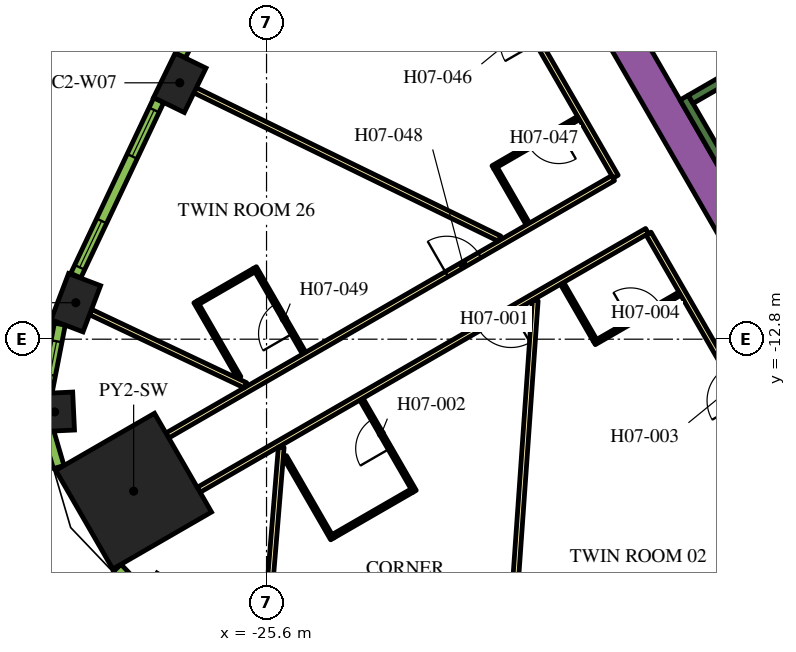
"""IFC4 building model, lengths in metres.
Left out: names, types, materials, properties, quantities, classifications, styles, units other than length and angle.
Written with IfcOpenShell. Run it as: python <this file> out.ifc"""

import sys

from ifc_helpers import new_model, si_unit, direction, frame, frame_2d, origin, origin_2d, place, context, subcontext, project, spatial, rectangle, extrude, element, fill, save


model = new_model("IFC4")
c1 = context("Model", 3, precision=1e-05, world=origin(), true_north=direction((0.0, 1.0)))
c2 = subcontext(c1, "Body", "Model", "MODEL_VIEW")
j1 = project(units=[si_unit("LENGTHUNIT", "METRE"), si_unit("PLANEANGLEUNIT", "RADIAN")], contexts=[c1])
p1 = place(None, origin())
s1 = spatial("IfcSite", under=j1, at=p1, CompositionType="ELEMENT")
p2 = place(p1, origin())
s2 = spatial("IfcBuilding", under=s1, at=p2, CompositionType="ELEMENT")
p3 = place(p2, frame((0.0, 0.0, 95.4)))
s3 = spatial("IfcBuildingStorey", under=s2, at=p3, CompositionType="ELEMENT", Elevation=95.4)
p4 = place(p3, frame((-29.097, -16.799, 0.0), z_axis=(0.0, 0.0, 1.0), x_axis=(-0.866025403784, -0.5, 0.0)))
e1 = element("IfcColumn", 1, at=p4, inside=s3, PredefinedType="COLUMN", context=c2, shape_type="SweptSolid", body=[
    extrude(rectangle(XDim=3.0, YDim=3.0, at=origin_2d()), origin(), (0.0, 0.0, 1.0), 3.9),
])
for number, where, z_axis, x_axis in (
    (2, (-27.883, -6.054, 0.0), (0.0, 0.0, 1.0), (-0.438, -0.899, 0.0)),
    (3, (-30.619, -11.839, 0.0), (0.0, 0.0, 1.0), (-0.355, -0.935, 0.0)),
):
    element("IfcColumn", number, at=place(p3, frame(where, z_axis=z_axis, x_axis=x_axis)), inside=s3, PredefinedType="COLUMN", context=c2, shape_type="SweptSolid", body=[
        extrude(rectangle(XDim=1.3, YDim=0.9, at=origin_2d()), origin(), (0.0, 0.0, 1.0), 3.9),
    ])
p5 = place(p3, frame((-31.177, -14.714, 0.0), z_axis=(0.0, 0.0, 1.0), x_axis=(0.046756026083, -0.998906338965, 0.0)))
e4 = element("IfcColumn", 4, at=p5, inside=s3, PredefinedType="COLUMN", context=c2, shape_type="SweptSolid", body=[
    extrude(rectangle(XDim=1.0, YDim=1.0, at=origin_2d()), origin(), (0.0, 0.0, 1.0), 3.9),
])
p6 = place(p3, frame((-12.134, -11.883, 0.0), z_axis=(0.0, 0.0, 1.0), x_axis=(-0.500005339912, 0.866022320763, 0.0)))
e5 = element("IfcWall", 5, at=p6, inside=s3, PredefinedType="SOLIDWALL", context=c2, shape_type="SweptSolid", body=[
    extrude(rectangle(XDim=9.488, YDim=0.9, at=frame_2d((4.744, 0.0))), origin(), (0.0, 0.0, 1.0), 3.9),
])
p7 = place(p3, frame((-12.885, -9.431, 0.0), z_axis=(0.0, 0.0, 1.0), x_axis=(-0.500020560727, 0.866013532718, 0.0)))
e6 = element("IfcWall", 6, at=p7, inside=s3, PredefinedType="SOLIDWALL", context=c2, shape_type="SweptSolid", body=[
    extrude(rectangle(XDim=3.45, YDim=0.25, at=frame_2d((1.725, 0.0))), origin(), (0.0, 0.0, 1.0), 3.9),
])
p8 = place(p3, frame((-14.44, -6.49, 0.0), z_axis=(0.0, 0.0, 1.0), x_axis=(0.866022966069, 0.500004222222, 0.0)))
e7 = element("IfcWall", 7, at=p8, inside=s3, PredefinedType="SOLIDWALL", context=c2, shape_type="SweptSolid", body=[
    extrude(rectangle(XDim=6.8, YDim=0.25, at=frame_2d((3.4, 0.0))), origin(), (0.0, 0.0, 1.0), 3.9),
])
p9 = place(p3, frame((-16.412, -8.523, 0.0), z_axis=(0.0, 0.0, 1.0), x_axis=(-0.500001929737, 0.866024289647, 0.0)))
e8 = element("IfcWall", 8, at=p9, inside=s3, PredefinedType="PARTITIONING", context=c2, shape_type="SweptSolid", body=[
    extrude(rectangle(XDim=5.268, YDim=0.15, at=frame_2d((2.634, 0.0))), origin(), (0.0, 0.0, 1.0), 2.75),
])
p10 = place(p9, frame((4.088, 0.0, 0.0)))
e9 = element("IfcOpeningElement", 9, at=p10, cuts=e8, PredefinedType="OPENING", context=c2, shape_type="SweptSolid", body=[
    extrude(rectangle(XDim=1.0, YDim=2.1, at=frame_2d((0.5, 1.05))), frame((0.0, 0.085, 0.0), z_axis=(0.0, -1.0, 0.0), x_axis=(1.0, 0.0, 0.0)), (0.0, 0.0, 1.0), 0.17),
])
p11 = place(p3, frame((-28.211, -15.335, 0.0), z_axis=(0.0, 0.0, 1.0), x_axis=(0.866025884867, 0.49999916674, 0.0)))
e10 = element("IfcWall", 10, at=p11, inside=s3, PredefinedType="PARTITIONING", context=c2, shape_type="SweptSolid", body=[
    extrude(rectangle(XDim=13.543, YDim=0.15, at=frame_2d((6.772, 0.0))), origin(), (0.0, 0.0, 1.0), 2.75),
])
p12 = place(p11, frame((8.488, 0.0, 0.0)))
e11 = element("IfcOpeningElement", 11, at=p12, cuts=e10, PredefinedType="OPENING", context=c2, shape_type="SweptSolid", body=[
    extrude(rectangle(XDim=1.0, YDim=2.1, at=frame_2d((0.5, 1.05))), frame((0.0, 0.085, 0.0), z_axis=(0.0, -1.0, 0.0), x_axis=(1.0, 0.0, 0.0)), (0.0, 0.0, 1.0), 0.17),
])
p13 = place(p3, frame((-15.587, -9.952, 0.0), z_axis=(0.0, 0.0, 1.0), x_axis=(-0.866017869832, -0.500013048961, 0.0)))
e12 = element("IfcWall", 12, at=p13, inside=s3, PredefinedType="PARTITIONING", context=c2, shape_type="SweptSolid", body=[
    extrude(rectangle(XDim=13.624, YDim=0.15, at=frame_2d((6.812, 0.0))), origin(), (0.0, 0.0, 1.0), 2.75),
])
p14 = place(p13, frame((4.134, 0.0, 0.0)))
e13 = element("IfcOpeningElement", 13, at=p14, cuts=e12, PredefinedType="OPENING", context=c2, shape_type="SweptSolid", body=[
    extrude(rectangle(XDim=1.0, YDim=2.1, at=frame_2d((0.5, 1.05))), frame((0.0, 0.085, 0.0), z_axis=(0.0, -1.0, 0.0), x_axis=(1.0, 0.0, 0.0)), (0.0, 0.0, 1.0), 0.17),
])
p15 = place(p3, frame((-12.918, -14.575, 0.0), z_axis=(0.0, 0.0, 1.0), x_axis=(-0.500009150678, 0.866020120573, 0.0)))
e14 = element("IfcWall", 14, at=p15, inside=s3, PredefinedType="PARTITIONING", context=c2, shape_type="SweptSolid", body=[
    extrude(rectangle(XDim=5.258, YDim=0.15, at=frame_2d((2.629, 0.0))), origin(), (0.0, 0.0, 1.0), 2.75),
])
p16 = place(p15, frame((0.18, 0.0, 0.0)))
e15 = element("IfcOpeningElement", 15, at=p16, cuts=e14, PredefinedType="OPENING", context=c2, shape_type="SweptSolid", body=[
    extrude(rectangle(XDim=1.0, YDim=2.1, at=frame_2d((0.5, 1.05))), frame((0.0, 0.085, 0.0), z_axis=(0.0, -1.0, 0.0), x_axis=(1.0, 0.0, 0.0)), (0.0, 0.0, 1.0), 0.17),
])
p17 = place(p3, frame((-30.231, -12.085, 0.0), z_axis=(0.0, 0.0, 1.0), x_axis=(0.904001132572, -0.427530060122, 0.0)))
e16 = element("IfcWall", 16, at=p17, inside=s3, PredefinedType="PARTITIONING", context=c2, shape_type="SweptSolid", body=[
    extrude(rectangle(XDim=4.51, YDim=0.15, at=frame_2d((2.255, 0.0))), origin(), (0.0, 0.0, 1.0), 2.75),
])
p18 = place(p3, frame((-25.582, -20.138, 0.0), z_axis=(0.0, 0.0, 1.0), x_axis=(0.081746132986, 0.996653184283, 0.0)))
e17 = element("IfcWall", 17, at=p18, inside=s3, PredefinedType="PARTITIONING", context=c2, shape_type="SweptSolid", body=[
    extrude(rectangle(XDim=4.51, YDim=0.15, at=frame_2d((2.255, 0.0))), origin(), (0.0, 0.0, 1.0), 2.75),
])
p19 = place(p3, frame((-27.479, -6.251, 0.0), z_axis=(0.0, 0.0, 1.0), x_axis=(0.898945877276, -0.438059710231, 0.0)))
e18 = element("IfcWall", 18, at=p19, inside=s3, PredefinedType="PARTITIONING", context=c2, shape_type="SweptSolid", body=[
    extrude(rectangle(XDim=8.909, YDim=0.15, at=frame_2d((4.455, 0.0))), origin(), (0.0, 0.0, 1.0), 2.75),
])
p20 = place(p3, frame((-19.153, -20.671, 0.0), z_axis=(0.0, 0.0, 1.0), x_axis=(0.070070736723, 0.997542025107, 0.0)))
e19 = element("IfcWall", 19, at=p20, inside=s3, PredefinedType="PARTITIONING", context=c2, shape_type="SweptSolid", body=[
    extrude(rectangle(XDim=8.909, YDim=0.15, at=frame_2d((4.455, 0.0))), origin(), (0.0, 0.0, 1.0), 2.75),
])
p21 = place(p3, frame((-21.704, -16.803, 0.0), z_axis=(0.0, 0.0, 1.0), x_axis=(-0.500049511043, 0.865996816683, 0.0)))
e20 = element("IfcWall", 20, at=p21, inside=s3, PredefinedType="PARTITIONING", context=c2, shape_type="SweptSolid", body=[
    extrude(rectangle(XDim=2.8, YDim=0.1, at=frame_2d((1.4, 0.0))), origin(), (0.0, 0.0, 1.0), 2.75),
])
p22 = place(p21, frame((1.3, 0.0, 0.0)))
e21 = element("IfcOpeningElement", 21, at=p22, cuts=e20, PredefinedType="OPENING", context=c2, shape_type="SweptSolid", body=[
    extrude(rectangle(XDim=0.9, YDim=2.1, at=frame_2d((0.45, 1.05))), frame((0.0, 0.06, 0.0), z_axis=(0.0, -1.0, 0.0), x_axis=(1.0, 0.0, 0.0)), (0.0, 0.0, 1.0), 0.12),
])
p23 = place(p3, frame((-21.772, -16.785, 0.0), z_axis=(0.0, 0.0, 1.0), x_axis=(-0.866024647952, -0.500001309137, 0.0)))
e22 = element("IfcWall", 22, at=p23, inside=s3, PredefinedType="PARTITIONING", context=c2, shape_type="SweptSolid", body=[
    extrude(rectangle(XDim=2.4, YDim=0.1, at=frame_2d((1.2, 0.0))), origin(), (0.0, 0.0, 1.0), 2.75),
])
p24 = place(p3, frame((-25.119, -15.888, 0.0), z_axis=(0.0, 0.0, 1.0), x_axis=(0.500046524342, -0.865998541277, 0.0)))
e23 = element("IfcWall", 23, at=p24, inside=s3, PredefinedType="PARTITIONING", context=c2, shape_type="SweptSolid", body=[
    extrude(rectangle(XDim=2.5, YDim=0.1, at=frame_2d((1.25, 0.0))), origin(), (0.0, 0.0, 1.0), 2.75),
])
p25 = place(p3, frame((-16.974, -12.9, 0.0), z_axis=(0.0, 0.0, 1.0), x_axis=(0.865997922154, 0.500047596559, 0.0)))
e24 = element("IfcWall", 24, at=p25, inside=s3, PredefinedType="PARTITIONING", context=c2, shape_type="SweptSolid", body=[
    extrude(rectangle(XDim=2.6, YDim=0.1, at=frame_2d((1.3, 0.0))), origin(), (0.0, 0.0, 1.0), 2.75),
])
p26 = place(p25, frame((1.1, 0.0, 0.0)))
e25 = element("IfcOpeningElement", 25, at=p26, cuts=e24, PredefinedType="OPENING", context=c2, shape_type="SweptSolid", body=[
    extrude(rectangle(XDim=0.9, YDim=2.1, at=frame_2d((0.45, 1.05))), frame((0.0, 0.06, 0.0), z_axis=(0.0, -1.0, 0.0), x_axis=(1.0, 0.0, 0.0)), (0.0, 0.0, 1.0), 0.12),
])
p27 = place(p3, frame((-16.956, -12.832, 0.0), z_axis=(0.0, 0.0, 1.0), x_axis=(-0.499978980201, 0.866037539231, 0.0)))
e26 = element("IfcWall", 26, at=p27, inside=s3, PredefinedType="PARTITIONING", context=c2, shape_type="SweptSolid", body=[
    extrude(rectangle(XDim=1.73, YDim=0.1, at=frame_2d((0.865, 0.0))), origin(), (0.0, 0.0, 1.0), 2.75),
])
p28 = place(p3, frame((-17.39, -6.979, 0.0), z_axis=(0.0, 0.0, 1.0), x_axis=(-0.866021400173, -0.500006934395, 0.0)))
e27 = element("IfcWall", 27, at=p28, inside=s3, PredefinedType="PARTITIONING", context=c2, shape_type="SweptSolid", body=[
    extrude(rectangle(XDim=2.6, YDim=0.1, at=frame_2d((1.3, 0.0))), origin(), (0.0, 0.0, 1.0), 2.75),
])
p29 = place(p28, frame((0.6, 0.0, 0.0)))
e28 = element("IfcOpeningElement", 28, at=p29, cuts=e27, PredefinedType="OPENING", context=c2, shape_type="SweptSolid", body=[
    extrude(rectangle(XDim=0.9, YDim=2.1, at=frame_2d((0.45, 1.05))), frame((0.0, 0.06, 0.0), z_axis=(0.0, -1.0, 0.0), x_axis=(1.0, 0.0, 0.0)), (0.0, 0.0, 1.0), 0.12),
])
p30 = place(p3, frame((-19.574, -8.297, 0.0), z_axis=(0.0, 0.0, 1.0), x_axis=(0.500062241894, -0.865989465428, 0.0)))
e29 = element("IfcWall", 29, at=p30, inside=s3, PredefinedType="PARTITIONING", context=c2, shape_type="SweptSolid", body=[
    extrude(rectangle(XDim=1.7, YDim=0.1, at=frame_2d((0.85, 0.0))), origin(), (0.0, 0.0, 1.0), 2.75),
])
p31 = place(p3, frame((-24.61, -13.169, 0.0), z_axis=(0.0, 0.0, 1.0), x_axis=(-0.500006934395, 0.866021400173, 0.0)))
e30 = element("IfcWall", 30, at=p31, inside=s3, PredefinedType="PARTITIONING", context=c2, shape_type="SweptSolid", body=[
    extrude(rectangle(XDim=2.6, YDim=0.1, at=frame_2d((1.3, 0.0))), origin(), (0.0, 0.0, 1.0), 2.75),
])
p32 = place(p31, frame((0.6, 0.0, 0.0)))
e31 = element("IfcOpeningElement", 31, at=p32, cuts=e30, PredefinedType="OPENING", context=c2, shape_type="SweptSolid", body=[
    extrude(rectangle(XDim=0.9, YDim=2.1, at=frame_2d((0.45, 1.05))), frame((0.0, 0.06, 0.0), z_axis=(0.0, -1.0, 0.0), x_axis=(1.0, 0.0, 0.0)), (0.0, 0.0, 1.0), 0.12),
])
p33 = place(p3, frame((-25.928, -10.986, 0.0), z_axis=(0.0, 0.0, 1.0), x_axis=(-0.865989465428, -0.500062241894, 0.0)))
e32 = element("IfcWall", 32, at=p33, inside=s3, PredefinedType="PARTITIONING", context=c2, shape_type="SweptSolid", body=[
    extrude(rectangle(XDim=1.7, YDim=0.1, at=frame_2d((0.85, 0.0))), origin(), (0.0, 0.0, 1.0), 2.75),
])
p34 = place(p3, frame((-26.319, -13.81, 0.0), z_axis=(0.0, 0.0, 1.0), x_axis=(-0.499952165731, 0.866053019151, 0.0)))
e33 = element("IfcWall", 33, at=p34, inside=s3, PredefinedType="PARTITIONING", context=c2, shape_type="SweptSolid", body=[
    extrude(rectangle(XDim=2.3, YDim=0.1, at=frame_2d((1.15, 0.0))), origin(), (0.0, 0.0, 1.0), 2.75),
])
p35 = place(p3, frame((-25.576, -0.778, 0.0), z_axis=(0.0, 0.0, 1.0), x_axis=(-0.448534297211, -0.893765620409, 0.0)))
e34 = element("IfcWall", 34, at=p35, inside=s3, PredefinedType="SOLIDWALL", context=c2, shape_type="SweptSolid", body=[
    extrude(rectangle(XDim=5.1, YDim=0.29, at=frame_2d((2.55, 0.0))), origin(), (0.0, 0.0, 1.0), 3.65),
])
p36 = place(p35, frame((0.272, 0.0, 0.9)))
e35 = element("IfcOpeningElement", 35, at=p36, cuts=e34, PredefinedType="OPENING", context=c2, shape_type="SweptSolid", body=[
    extrude(rectangle(XDim=1.35, YDim=2.15, at=frame_2d((0.675, 1.075))), frame((0.0, 0.155, 0.0), z_axis=(0.0, -1.0, 0.0), x_axis=(1.0, 0.0, 0.0)), (0.0, 0.0, 1.0), 0.31),
])
p37 = place(p35, frame((3.478, 0.0, 0.9)))
e36 = element("IfcOpeningElement", 36, at=p37, cuts=e34, PredefinedType="OPENING", context=c2, shape_type="SweptSolid", body=[
    extrude(rectangle(XDim=1.35, YDim=2.15, at=frame_2d((0.675, 1.075))), frame((0.0, 0.155, 0.0), z_axis=(0.0, -1.0, 0.0), x_axis=(1.0, 0.0, 0.0)), (0.0, 0.0, 1.0), 0.31),
])
p38 = place(p3, frame((-28.436, -6.511, 0.0), z_axis=(0.0, 0.0, 1.0), x_axis=(-0.427543726596, -0.903994669148, 0.0)))
e37 = element("IfcWall", 37, at=p38, inside=s3, PredefinedType="SOLIDWALL", context=c2, shape_type="SweptSolid", body=[
    extrude(rectangle(XDim=5.107, YDim=0.29, at=frame_2d((2.553, 0.0))), origin(), (0.0, 0.0, 1.0), 3.65),
])
p39 = place(p38, frame((0.285, 0.0, 0.9)))
e38 = element("IfcOpeningElement", 38, at=p39, cuts=e37, PredefinedType="OPENING", context=c2, shape_type="SweptSolid", body=[
    extrude(rectangle(XDim=1.35, YDim=2.15, at=frame_2d((0.675, 1.075))), frame((0.0, 0.155, 0.0), z_axis=(0.0, -1.0, 0.0), x_axis=(1.0, 0.0, 0.0)), (0.0, 0.0, 1.0), 0.31),
])
p40 = place(p38, frame((3.516, 0.0, 0.9)))
e39 = element("IfcOpeningElement", 39, at=p40, cuts=e37, PredefinedType="OPENING", context=c2, shape_type="SweptSolid", body=[
    extrude(rectangle(XDim=1.35, YDim=2.15, at=frame_2d((0.675, 1.075))), frame((0.0, 0.155, 0.0), z_axis=(0.0, -1.0, 0.0), x_axis=(1.0, 0.0, 0.0)), (0.0, 0.0, 1.0), 0.31),
])
p41 = place(p3, frame((-31.039, -12.403, 0.0), z_axis=(0.0, 0.0, 1.0), x_axis=(-0.190409913989, -0.981704672829, 0.0)))
e40 = element("IfcWall", 40, at=p41, inside=s3, PredefinedType="SOLIDWALL", context=c2, shape_type="SweptSolid", body=[
    extrude(rectangle(XDim=1.819, YDim=0.29, at=frame_2d((0.91, 0.0))), origin(), (0.0, 0.0, 1.0), 3.65),
])
p42 = place(p41, frame((0.46, 0.0, 0.9)))
e41 = element("IfcOpeningElement", 41, at=p42, cuts=e40, PredefinedType="OPENING", context=c2, shape_type="SweptSolid", body=[
    extrude(rectangle(XDim=0.9, YDim=2.15, at=frame_2d((0.45, 1.075))), frame((0.0, 0.155, 0.0), z_axis=(0.0, -1.0, 0.0), x_axis=(1.0, 0.0, 0.0)), (0.0, 0.0, 1.0), 0.31),
])
p43 = place(p3, frame((-31.336, -15.256, 0.0), z_axis=(0.0, 0.0, 1.0), x_axis=(0.281454582132, -0.95957455062, 0.0)))
e42 = element("IfcWall", 42, at=p43, inside=s3, PredefinedType="SOLIDWALL", context=c2, shape_type="SweptSolid", body=[
    extrude(rectangle(XDim=0.947, YDim=0.29, at=frame_2d((0.474, 0.0))), origin(), (0.0, 0.0, 1.0), 3.65),
])
p44 = place(p3, frame((-29.534, -18.824, 0.0), z_axis=(0.0, 0.0, 1.0), x_axis=(0.690414427296, -0.723414071319, 0.0)))
e43 = element("IfcWall", 43, at=p44, inside=s3, PredefinedType="SOLIDWALL", context=c2, shape_type="SweptSolid", body=[
    extrude(rectangle(XDim=0.947, YDim=0.29, at=frame_2d((0.474, 0.0))), origin(), (0.0, 0.0, 1.0), 3.65),
])
p45 = place(p14, origin())
e44 = element("IfcDoor", 44, at=p45, inside=s3, OperationType="SINGLE_SWING_LEFT", PredefinedType="DOOR", context=c2, shape_type="SweptSolid", body=[
    extrude(rectangle(XDim=1.0, YDim=2.1, at=frame_2d((0.5, 1.05))), frame((0.0, 0.025, 0.0), z_axis=(0.0, -1.0, 0.0), x_axis=(1.0, 0.0, 0.0)), (0.0, 0.0, 1.0), 0.05),
])
fill(e13, e44)
p46 = place(p22, origin())
e45 = element("IfcDoor", 45, at=p46, inside=s3, OperationType="SINGLE_SWING_LEFT", PredefinedType="DOOR", context=c2, shape_type="SweptSolid", body=[
    extrude(rectangle(XDim=0.9, YDim=2.1, at=frame_2d((0.45, 1.05))), frame((0.0, 0.025, 0.0), z_axis=(0.0, -1.0, 0.0), x_axis=(1.0, 0.0, 0.0)), (0.0, 0.0, 1.0), 0.05),
])
fill(e21, e45)
p47 = place(p26, origin())
e46 = element("IfcDoor", 46, at=p47, inside=s3, OperationType="SINGLE_SWING_LEFT", PredefinedType="DOOR", context=c2, shape_type="SweptSolid", body=[
    extrude(rectangle(XDim=0.9, YDim=2.1, at=frame_2d((0.45, 1.05))), frame((0.0, 0.025, 0.0), z_axis=(0.0, -1.0, 0.0), x_axis=(1.0, 0.0, 0.0)), (0.0, 0.0, 1.0), 0.05),
])
fill(e25, e46)
p48 = place(p29, origin())
e47 = element("IfcDoor", 47, at=p48, inside=s3, OperationType="SINGLE_SWING_LEFT", PredefinedType="DOOR", context=c2, shape_type="SweptSolid", body=[
    extrude(rectangle(XDim=0.9, YDim=2.1, at=frame_2d((0.45, 1.05))), frame((0.0, 0.025, 0.0), z_axis=(0.0, -1.0, 0.0), x_axis=(1.0, 0.0, 0.0)), (0.0, 0.0, 1.0), 0.05),
])
fill(e28, e47)
p49 = place(p12, origin())
e48 = element("IfcDoor", 48, at=p49, inside=s3, OperationType="SINGLE_SWING_RIGHT", PredefinedType="DOOR", context=c2, shape_type="SweptSolid", body=[
    extrude(rectangle(XDim=1.0, YDim=2.1, at=frame_2d((0.5, 1.05))), frame((0.0, 0.025, 0.0), z_axis=(0.0, -1.0, 0.0), x_axis=(1.0, 0.0, 0.0)), (0.0, 0.0, 1.0), 0.05),
])
fill(e11, e48)
p50 = place(p32, origin())
e49 = element("IfcDoor", 49, at=p50, inside=s3, OperationType="SINGLE_SWING_LEFT", PredefinedType="DOOR", context=c2, shape_type="SweptSolid", body=[
    extrude(rectangle(XDim=0.9, YDim=2.1, at=frame_2d((0.45, 1.05))), frame((0.0, 0.025, 0.0), z_axis=(0.0, -1.0, 0.0), x_axis=(1.0, 0.0, 0.0)), (0.0, 0.0, 1.0), 0.05),
])
fill(e31, e49)
p51 = place(p39, origin())
e50 = element("IfcWindow", 50, at=p51, inside=s3, PartitioningType="DOUBLE_PANEL_VERTICAL", PredefinedType="WINDOW", context=c2, shape_type="SweptSolid", body=[
    extrude(rectangle(XDim=1.35, YDim=2.15, at=frame_2d((0.675, 1.075))), frame((0.0, 0.015, 0.0), z_axis=(0.0, -1.0, 0.0), x_axis=(1.0, 0.0, 0.0)), (0.0, 0.0, 1.0), 0.06),
])
fill(e38, e50)
p52 = place(p40, origin())
e51 = element("IfcWindow", 51, at=p52, inside=s3, PartitioningType="DOUBLE_PANEL_VERTICAL", PredefinedType="WINDOW", context=c2, shape_type="SweptSolid", body=[
    extrude(rectangle(XDim=1.35, YDim=2.15, at=frame_2d((0.675, 1.075))), frame((0.0, 0.015, 0.0), z_axis=(0.0, -1.0, 0.0), x_axis=(1.0, 0.0, 0.0)), (0.0, 0.0, 1.0), 0.06),
])
fill(e39, e51)
p53 = place(p42, origin())
e52 = element("IfcWindow", 52, at=p53, inside=s3, PartitioningType="SINGLE_PANEL", PredefinedType="WINDOW", context=c2, shape_type="SweptSolid", body=[
    extrude(rectangle(XDim=0.9, YDim=2.15, at=frame_2d((0.45, 1.075))), frame((0.0, 0.015, 0.0), z_axis=(0.0, -1.0, 0.0), x_axis=(1.0, 0.0, 0.0)), (0.0, 0.0, 1.0), 0.06),
])
fill(e41, e52)
save(model, sys.argv[1])
